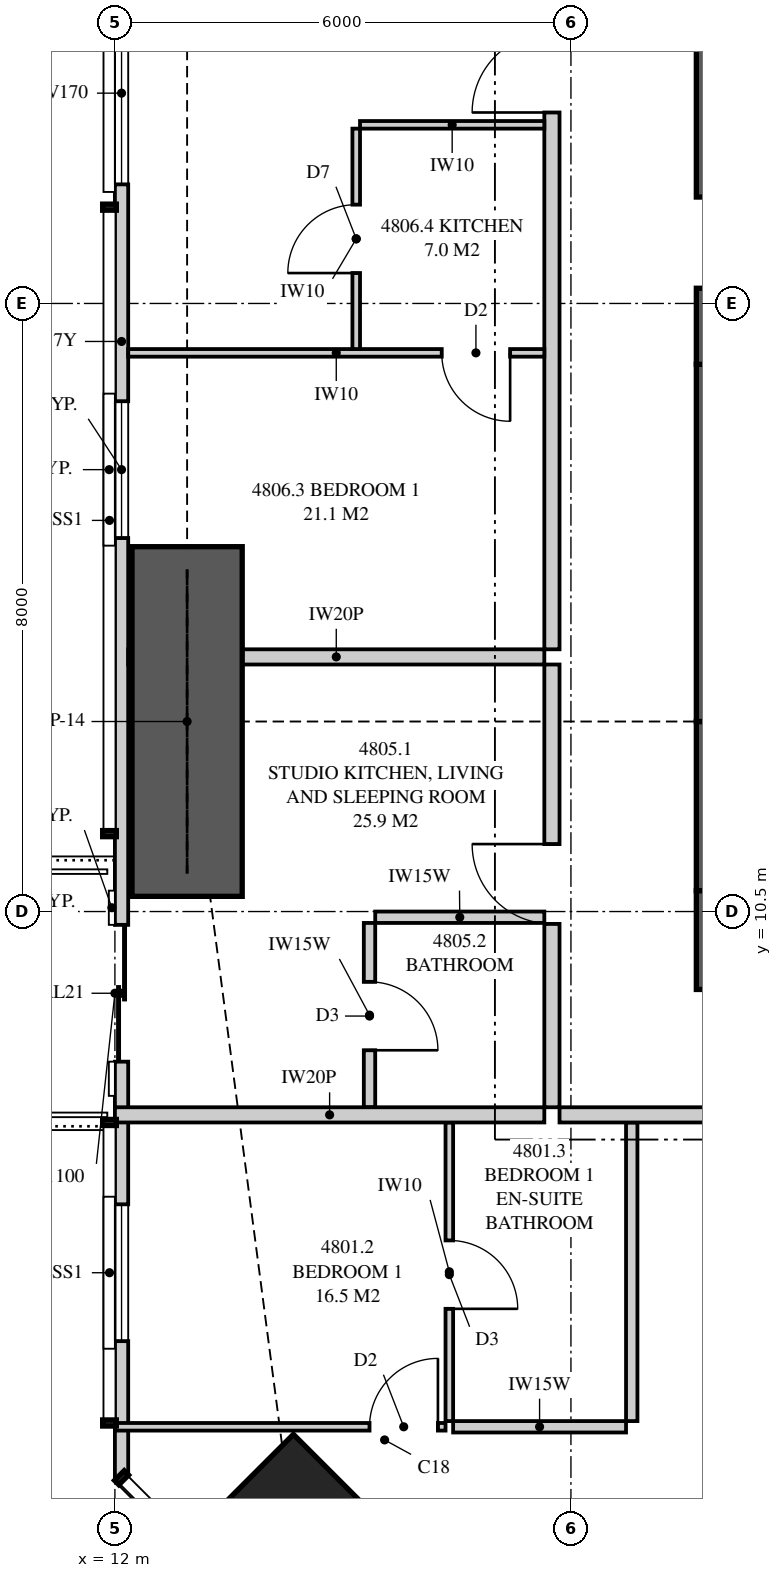
"""IFC4 building model, lengths in metres.
Left out: names, types, materials, properties, quantities, classifications, styles, units other than length and angle.
Written with IfcOpenShell. Run it as: python <this file> out.ifc"""

import sys

from ifc_helpers import new_model, si_unit, direction, frame, frame_2d, origin, origin_2d, place, context, subcontext, project, spatial, polyline, rectangle, outline, extrude, element, fill, save


model = new_model("IFC4")
c1 = context("Model", 3, precision=1e-05, world=origin(), true_north=direction((0.0, 1.0)))
c2 = subcontext(c1, "Body", "Model", "MODEL_VIEW")
j1 = project(units=[si_unit("LENGTHUNIT", "METRE"), si_unit("PLANEANGLEUNIT", "RADIAN")], contexts=[c1])
p1 = place(None, origin())
s1 = spatial("IfcSite", under=j1, at=p1, CompositionType="ELEMENT")
p2 = place(p1, origin())
s2 = spatial("IfcBuilding", under=s1, at=p2, CompositionType="ELEMENT")
p3 = place(p2, frame((0.0, 0.0, 177.8)))
s3 = spatial("IfcBuildingStorey", under=s2, at=p3, CompositionType="ELEMENT", Elevation=177.8)
p4 = place(p3, frame((14.348, 2.348, 0.0), z_axis=(0.0, 0.0, 1.0), x_axis=(0.707106781187, 0.707106781187, 0.0)))
e1 = element("IfcColumn", 1, at=p4, inside=s3, PredefinedType="COLUMN", context=c2, shape_type="SweptSolid", body=[
    extrude(rectangle(XDim=1.8, YDim=1.8, at=origin_2d()), origin(), (0.0, 0.0, 1.0), 3.35),
])
p5 = place(p3, frame((19.65, 10.125, 0.0), z_axis=(0.0, 0.0, 1.0), x_axis=(1.0, 0.0, 0.0)))
e2 = element("IfcWall", 2, at=p5, inside=s3, PredefinedType="SHEAR", context=c2, shape_type="SweptSolid", body=[
    extrude(rectangle(XDim=6.35, YDim=1.3, at=frame_2d((3.175, 0.0))), origin(), (0.0, 0.0, 1.0), 3.35),
])
p6 = place(p5, frame((4.775, 0.0, 0.0)))
e3 = element("IfcOpeningElement", 3, at=p6, cuts=e2, PredefinedType="OPENING", context=c2, shape_type="SweptSolid", body=[
    extrude(rectangle(XDim=0.75, YDim=2.1, at=frame_2d((0.375, 1.05))), frame((0.0, 0.66, 0.0), z_axis=(0.0, -1.0, 0.0), x_axis=(1.0, 0.0, 0.0)), (0.0, 0.0, 1.0), 1.32),
])
p7 = place(p3, frame((20.0, 23.3, 0.0), z_axis=(0.0, 0.0, 1.0), x_axis=(0.0, -1.0, 0.0)))
e4 = element("IfcWall", 4, at=p7, inside=s3, PredefinedType="SHEAR", context=c2, shape_type="SweptSolid", body=[
    extrude(rectangle(XDim=5.6, YDim=0.7, at=frame_2d((2.8, 0.0))), origin(), (0.0, 0.0, 1.0), 3.35),
])
p8 = place(p7, frame((3.4, 0.0, 0.0)))
e5 = element("IfcOpeningElement", 5, at=p8, cuts=e4, PredefinedType="OPENING", context=c2, shape_type="SweptSolid", body=[
    extrude(rectangle(XDim=1.2, YDim=2.2, at=frame_2d((0.6, 1.1))), frame((0.0, 0.36, 0.0), z_axis=(0.0, -1.0, 0.0), x_axis=(1.0, 0.0, 0.0)), (0.0, 0.0, 1.0), 0.72),
])
p9 = place(p3, frame((20.0, 17.7, 0.0), z_axis=(0.0, 0.0, 1.0), x_axis=(0.0, -1.0, 0.0)))
e6 = element("IfcWall", 6, at=p9, inside=s3, PredefinedType="SHEAR", context=c2, shape_type="SweptSolid", body=[
    extrude(rectangle(XDim=4.7, YDim=0.7, at=frame_2d((2.35, 0.0))), origin(), (0.0, 0.0, 1.0), 3.35),
])
p10 = place(p3, frame((20.0, 13.0, 0.0), z_axis=(0.0, 0.0, 1.0), x_axis=(0.0, -1.0, 0.0)))
e7 = element("IfcWall", 7, at=p10, inside=s3, PredefinedType="SHEAR", context=c2, shape_type="SweptSolid", body=[
    extrude(rectangle(XDim=2.225, YDim=0.7, at=frame_2d((1.113, 0.0))), origin(), (0.0, 0.0, 1.0), 3.35),
])
p11 = place(p3, frame((12.087, 32.949, 0.0), z_axis=(0.0, 0.0, 1.0), x_axis=(0.0, -1.0, 0.0)))
e8 = element("IfcWall", 8, at=p11, inside=s3, PredefinedType="SOLIDWALL", context=c2, shape_type="SweptSolid", body=[
    extrude(outline(polyline([(0.0, 0.0), (29.897, 0.0), (29.897, 3.11), (20.191, 3.11), (20.191, 2.15), (20.051, 2.15), (20.051, 3.11), (19.949, 3.11), (19.949, 2.15), (7.949, 2.15), (7.949, 3.11), (7.823, 3.11), (7.823, 2.15), (7.73, 2.15), (7.73, 3.11), (0.0, 3.11), (0.0, 0.0)])), frame((0.0, 0.087, 0.0), z_axis=(0.0, -1.0, 0.0), x_axis=(1.0, 0.0, 0.0)), (0.0, 0.0, 1.0), 0.175),
])
p12 = place(p11, frame((1.237, 0.0, 0.4)))
e9 = element("IfcOpeningElement", 9, at=p12, cuts=e8, PredefinedType="OPENING", context=c2, shape_type="SweptSolid", body=[
    extrude(rectangle(XDim=1.2, YDim=1.7, at=frame_2d((0.6, 0.85))), frame((0.0, 0.097, 0.0), z_axis=(0.0, -1.0, 0.0), x_axis=(1.0, 0.0, 0.0)), (0.0, 0.0, 1.0), 0.195),
])
p13 = place(p11, frame((10.482, 0.0, 0.4)))
e10 = element("IfcOpeningElement", 10, at=p13, cuts=e8, PredefinedType="OPENING", context=c2, shape_type="SweptSolid", body=[
    extrude(rectangle(XDim=2.4, YDim=1.7, at=frame_2d((1.2, 0.85))), frame((0.0, 0.097, 0.0), z_axis=(0.0, -1.0, 0.0), x_axis=(1.0, 0.0, 0.0)), (0.0, 0.0, 1.0), 0.195),
])
p14 = place(p11, frame((15.735, 0.0, 0.4)))
e11 = element("IfcOpeningElement", 11, at=p14, cuts=e8, PredefinedType="OPENING", context=c2, shape_type="SweptSolid", body=[
    extrude(rectangle(XDim=1.8, YDim=1.7, at=frame_2d((0.9, 0.85))), frame((0.0, 0.097, 0.0), z_axis=(0.0, -1.0, 0.0), x_axis=(1.0, 0.0, 0.0)), (0.0, 0.0, 1.0), 0.195),
])
p15 = place(p11, frame((22.624, 0.0, 0.0)))
e12 = element("IfcOpeningElement", 12, at=p15, cuts=e8, PredefinedType="OPENING", context=c2, shape_type="SweptSolid", body=[
    extrude(rectangle(XDim=1.8, YDim=2.1, at=frame_2d((0.9, 1.05))), frame((0.0, 0.097, 0.0), z_axis=(0.0, -1.0, 0.0), x_axis=(1.0, 0.0, 0.0)), (0.0, 0.0, 1.0), 0.195),
])
p16 = place(p11, frame((26.301, 0.0, 0.4)))
e13 = element("IfcOpeningElement", 13, at=p16, cuts=e8, PredefinedType="OPENING", context=c2, shape_type="SweptSolid", body=[
    extrude(rectangle(XDim=1.8, YDim=1.7, at=frame_2d((0.9, 0.85))), frame((0.0, 0.097, 0.0), z_axis=(0.0, -1.0, 0.0), x_axis=(1.0, 0.0, 0.0)), (0.0, 0.0, 1.0), 0.195),
])
p17 = place(p3, frame((17.85, 7.825, 0.0), z_axis=(0.0, 0.0, 1.0), x_axis=(1.0, 0.0, 0.0)))
e14 = element("IfcWall", 14, at=p17, inside=s3, PredefinedType="PARTITIONING", context=c2, shape_type="SweptSolid", body=[
    extrude(outline(polyline([(0.0, 0.0), (5.9, 0.0), (5.9, 3.11), (4.737, 3.11), (4.737, 2.541), (4.062, 2.541), (4.062, 3.11), (0.0, 3.11), (0.0, 0.0)])), frame((0.0, 0.1, 0.0), z_axis=(0.0, -1.0, 0.0), x_axis=(1.0, 0.0, 0.0)), (0.0, 0.0, 1.0), 0.2),
])
p18 = place(p17, frame((2.5, 0.0, 0.0)))
e15 = element("IfcOpeningElement", 15, at=p18, cuts=e14, PredefinedType="OPENING", context=c2, shape_type="SweptSolid", body=[
    extrude(rectangle(XDim=1.05, YDim=2.2, at=frame_2d((0.525, 1.1))), frame((0.0, 0.11, 0.0), z_axis=(0.0, -1.0, 0.0), x_axis=(1.0, 0.0, 0.0)), (0.0, 0.0, 1.0), 0.22),
])
p19 = place(p3, frame((16.4, 3.796, 0.0), z_axis=(0.0, 0.0, 1.0), x_axis=(0.0, 1.0, 0.0)))
e16 = element("IfcWall", 16, at=p19, inside=s3, PredefinedType="PARTITIONING", context=c2, shape_type="SweptSolid", body=[
    extrude(rectangle(XDim=3.929, YDim=0.1, at=frame_2d((1.964, 0.0))), origin(), (0.0, 0.0, 1.0), 3.11),
])
p20 = place(p19, frame((1.477, 0.0, 0.0)))
e17 = element("IfcOpeningElement", 17, at=p20, cuts=e16, PredefinedType="OPENING", context=c2, shape_type="SweptSolid", body=[
    extrude(rectangle(XDim=0.9, YDim=2.1, at=frame_2d((0.45, 1.05))), frame((0.0, 0.06, 0.0), z_axis=(0.0, -1.0, 0.0), x_axis=(1.0, 0.0, 0.0)), (0.0, 0.0, 1.0), 0.12),
])
p21 = place(p3, frame((16.35, 3.721, 0.0), z_axis=(0.0, 0.0, 1.0), x_axis=(-1.0, 0.0, 0.0)))
e18 = element("IfcWall", 18, at=p21, inside=s3, PredefinedType="PARTITIONING", context=c2, shape_type="SweptSolid", body=[
    extrude(outline(polyline([(0.0, 0.0), (4.35, 0.0), (4.35, 3.11), (3.049, 3.11), (3.049, 2.15), (1.314, 2.15), (1.314, 3.11), (0.0, 3.11), (0.0, 0.0)])), frame((0.0, 0.05, 0.0), z_axis=(0.0, -1.0, 0.0), x_axis=(1.0, 0.0, 0.0)), (0.0, 0.0, 1.0), 0.1),
])
p22 = place(p21, frame((0.1, 0.0, 0.0)))
e19 = element("IfcOpeningElement", 19, at=p22, cuts=e18, PredefinedType="OPENING", context=c2, shape_type="SweptSolid", body=[
    extrude(rectangle(XDim=0.9, YDim=2.1, at=frame_2d((0.45, 1.05))), frame((0.0, 0.06, 0.0), z_axis=(0.0, -1.0, 0.0), x_axis=(1.0, 0.0, 0.0)), (0.0, 0.0, 1.0), 0.12),
])
p23 = place(p3, frame((18.725, 3.721, 0.0), z_axis=(0.0, 0.0, 1.0), x_axis=(-1.0, 0.0, 0.0)))
e20 = element("IfcWall", 20, at=p23, inside=s3, PredefinedType="PLUMBINGWALL", context=c2, shape_type="SweptSolid", body=[
    extrude(rectangle(XDim=2.275, YDim=0.15, at=frame_2d((1.138, 0.0))), origin(), (0.0, 0.0, 1.0), 3.11),
])
p24 = place(p3, frame((18.8, 3.796, 0.0), z_axis=(0.0, 0.0, 1.0), x_axis=(0.0, 1.0, 0.0)))
e21 = element("IfcWall", 21, at=p24, inside=s3, PredefinedType="PLUMBINGWALL", context=c2, shape_type="SweptSolid", body=[
    extrude(rectangle(XDim=3.929, YDim=0.15, at=frame_2d((1.964, 0.0))), origin(), (0.0, 0.0, 1.0), 3.11),
])
p25 = place(p3, frame((12.0, 7.825, 0.0), z_axis=(0.0, 0.0, 1.0), x_axis=(1.0, 0.0, 0.0)))
e22 = element("IfcWall", 22, at=p25, inside=s3, PredefinedType="PARTITIONING", context=c2, shape_type="SweptSolid", body=[
    extrude(outline(polyline([(0.0, 0.0), (5.65, 0.0), (5.65, 3.11), (2.547, 3.11), (2.547, 2.15), (0.712, 2.15), (0.712, 3.11), (0.0, 3.11), (0.0, 0.0)])), frame((0.0, 0.1, 0.0), z_axis=(0.0, -1.0, 0.0), x_axis=(1.0, 0.0, 0.0)), (0.0, 0.0, 1.0), 0.2),
])
p26 = place(p3, frame((12.175, 13.85, 0.0), z_axis=(0.0, 0.0, 1.0), x_axis=(1.0, 0.0, 0.0)))
e23 = element("IfcWall", 23, at=p26, inside=s3, PredefinedType="PARTITIONING", context=c2, shape_type="SweptSolid", body=[
    extrude(outline(polyline([(0.529, 2.15), (0.0, 2.15), (0.0, 0.0), (0.529, 0.0), (0.529, 0.834), (1.021, 0.834), (1.021, 0.0), (5.475, 0.0), (5.475, 3.11), (1.685, 3.11), (1.685, 2.15), (1.021, 2.15), (1.021, 1.315), (0.529, 1.315), (0.529, 2.15)])), frame((0.0, 0.1, 0.0), z_axis=(0.0, -1.0, 0.0), x_axis=(1.0, 0.0, 0.0)), (0.0, 0.0, 1.0), 0.2),
])
p27 = place(p3, frame((17.75, 7.925, 0.0), z_axis=(0.0, 0.0, 1.0), x_axis=(0.0, 1.0, 0.0)))
e24 = element("IfcWall", 24, at=p27, inside=s3, PredefinedType="PARTITIONING", context=c2, shape_type="SweptSolid", body=[
    extrude(outline(polyline([(0.0, 0.0), (5.825, 0.0), (5.825, 3.11), (5.412, 3.11), (5.412, 2.541), (4.738, 2.541), (4.738, 3.11), (0.0, 3.11), (0.0, 0.0)])), frame((0.0, 0.1, 0.0), z_axis=(0.0, -1.0, 0.0), x_axis=(1.0, 0.0, 0.0)), (0.0, 0.0, 1.0), 0.2),
])
p28 = place(p27, frame((2.413, 0.0, 0.0)))
e25 = element("IfcOpeningElement", 25, at=p28, cuts=e24, PredefinedType="OPENING", context=c2, shape_type="SweptSolid", body=[
    extrude(rectangle(XDim=1.05, YDim=2.2, at=frame_2d((0.525, 1.1))), frame((0.0, 0.11, 0.0), z_axis=(0.0, -1.0, 0.0), x_axis=(1.0, 0.0, 0.0)), (0.0, 0.0, 1.0), 0.22),
])
p29 = place(p3, frame((15.35, 7.925, 0.0), z_axis=(0.0, 0.0, 1.0), x_axis=(0.0, 1.0, 0.0)))
e26 = element("IfcWall", 26, at=p29, inside=s3, PredefinedType="PLUMBINGWALL", context=c2, shape_type="SweptSolid", body=[
    extrude(rectangle(XDim=2.425, YDim=0.15, at=frame_2d((1.212, 0.0))), origin(), (0.0, 0.0, 1.0), 3.11),
])
p30 = place(p29, frame((0.75, 0.0, 0.0)))
e27 = element("IfcOpeningElement", 27, at=p30, cuts=e26, PredefinedType="OPENING", context=c2, shape_type="SweptSolid", body=[
    extrude(rectangle(XDim=0.9, YDim=2.1, at=frame_2d((0.45, 1.05))), frame((0.0, 0.085, 0.0), z_axis=(0.0, -1.0, 0.0), x_axis=(1.0, 0.0, 0.0)), (0.0, 0.0, 1.0), 0.17),
])
p31 = place(p3, frame((15.425, 10.425, 0.0), z_axis=(0.0, 0.0, 1.0), x_axis=(1.0, 0.0, 0.0)))
e28 = element("IfcWall", 28, at=p31, inside=s3, PredefinedType="PLUMBINGWALL", context=c2, shape_type="SweptSolid", body=[
    extrude(rectangle(XDim=2.225, YDim=0.15, at=frame_2d((1.112, 0.0))), origin(), (0.0, 0.0, 1.0), 3.11),
])
p32 = place(p3, frame((17.75, 13.95, 0.0), z_axis=(0.0, 0.0, 1.0), x_axis=(0.0, 1.0, 0.0)))
e29 = element("IfcWall", 29, at=p32, inside=s3, PredefinedType="PARTITIONING", context=c2, shape_type="SweptSolid", body=[
    extrude(outline(polyline([(0.0, 0.0), (15.125, 0.0), (15.125, 3.11), (11.387, 3.11), (11.387, 2.541), (10.713, 2.541), (10.713, 3.11), (0.0, 3.11), (0.0, 0.0)])), frame((0.0, 0.1, 0.0), z_axis=(0.0, -1.0, 0.0), x_axis=(1.0, 0.0, 0.0)), (0.0, 0.0, 1.0), 0.2),
])
p33 = place(p32, frame((7.062, 0.0, 0.0)))
e30 = element("IfcOpeningElement", 30, at=p33, cuts=e29, PredefinedType="OPENING", context=c2, shape_type="SweptSolid", body=[
    extrude(rectangle(XDim=1.05, YDim=2.2, at=frame_2d((0.525, 1.1))), frame((0.0, 0.11, 0.0), z_axis=(0.0, -1.0, 0.0), x_axis=(1.0, 0.0, 0.0)), (0.0, 0.0, 1.0), 0.22),
])
p34 = place(p3, frame((12.175, 17.85, 0.0), z_axis=(0.0, 0.0, 1.0), x_axis=(1.0, 0.0, 0.0)))
e31 = element("IfcWall", 31, at=p34, inside=s3, PredefinedType="PARTITIONING", context=c2, shape_type="SweptSolid", body=[
    extrude(outline(polyline([(0.0, 0.0), (5.475, 0.0), (5.475, 3.11), (1.635, 3.11), (1.635, 2.15), (0.0, 2.15), (0.0, 3.11), (0.0, 0.0)])), frame((0.0, 0.05, 0.0), z_axis=(0.0, -1.0, 0.0), x_axis=(1.0, 0.0, 0.0)), (0.0, 0.0, 1.0), 0.1),
])
p35 = place(p34, frame((4.125, 0.0, 0.0)))
e32 = element("IfcOpeningElement", 32, at=p35, cuts=e31, PredefinedType="OPENING", context=c2, shape_type="SweptSolid", body=[
    extrude(rectangle(XDim=0.9, YDim=2.1, at=frame_2d((0.45, 1.05))), frame((0.0, 0.06, 0.0), z_axis=(0.0, -1.0, 0.0), x_axis=(1.0, 0.0, 0.0)), (0.0, 0.0, 1.0), 0.12),
])
p36 = place(p3, frame((15.175, 17.9, 0.0), z_axis=(0.0, 0.0, 1.0), x_axis=(0.0, 1.0, 0.0)))
e33 = element("IfcWall", 33, at=p36, inside=s3, PredefinedType="PARTITIONING", context=c2, shape_type="SweptSolid", body=[
    extrude(rectangle(XDim=2.9, YDim=0.1, at=frame_2d((1.45, 0.0))), origin(), (0.0, 0.0, 1.0), 3.11),
])
p37 = place(p36, frame((1.0, 0.0, 0.0)))
e34 = element("IfcOpeningElement", 34, at=p37, cuts=e33, PredefinedType="OPENING", context=c2, shape_type="SweptSolid", body=[
    extrude(rectangle(XDim=0.9, YDim=2.1, at=frame_2d((0.45, 1.05))), frame((0.0, 0.06, 0.0), z_axis=(0.0, -1.0, 0.0), x_axis=(1.0, 0.0, 0.0)), (0.0, 0.0, 1.0), 0.12),
])
p38 = place(p3, frame((15.225, 20.85, 0.0), z_axis=(0.0, 0.0, 1.0), x_axis=(1.0, 0.0, 0.0)))
e35 = element("IfcWall", 35, at=p38, inside=s3, PredefinedType="PARTITIONING", context=c2, shape_type="SweptSolid", body=[
    extrude(rectangle(XDim=2.425, YDim=0.1, at=frame_2d((1.212, 0.0))), origin(), (0.0, 0.0, 1.0), 3.11),
])
p39 = place(p3, frame((12.95, 10.7, 0.0), z_axis=(0.0, 0.0, 1.0), x_axis=(0.0, 1.0, 0.0)))
e36 = element("IfcWall", 36, at=p39, inside=s3, PredefinedType="SHEAR", context=c2, shape_type="SweptSolid", body=[
    extrude(rectangle(XDim=4.6, YDim=1.45, at=frame_2d((2.3, 0.0))), origin(), (0.0, 0.0, 1.0), 3.35),
])
p40 = place(p13, origin())
e37 = element("IfcWindow", 37, at=p40, inside=s3, PartitioningType="SINGLE_PANEL", PredefinedType="WINDOW", context=c2, shape_type="SweptSolid", body=[
    extrude(rectangle(XDim=2.4, YDim=1.7, at=frame_2d((1.2, 0.85))), frame((0.0, 0.03, 0.0), z_axis=(0.0, -1.0, 0.0), x_axis=(1.0, 0.0, 0.0)), (0.0, 0.0, 1.0), 0.06),
])
fill(e10, e37)
p41 = place(p14, origin())
e38 = element("IfcWindow", 38, at=p41, inside=s3, PartitioningType="SINGLE_PANEL", PredefinedType="WINDOW", context=c2, shape_type="SweptSolid", body=[
    extrude(rectangle(XDim=1.8, YDim=1.7, at=frame_2d((0.9, 0.85))), frame((0.0, 0.03, 0.0), z_axis=(0.0, -1.0, 0.0), x_axis=(1.0, 0.0, 0.0)), (0.0, 0.0, 1.0), 0.06),
])
fill(e11, e38)
p42 = place(p15, origin())
e39 = element("IfcDoor", 39, at=p42, inside=s3, OperationType="SLIDING_TO_LEFT", PredefinedType="DOOR", context=c2, shape_type="SweptSolid", body=[
    extrude(rectangle(XDim=1.8, YDim=2.1, at=frame_2d((0.9, 1.05))), frame((0.0, 0.025, 0.0), z_axis=(0.0, -1.0, 0.0), x_axis=(1.0, 0.0, 0.0)), (0.0, 0.0, 1.0), 0.05),
])
fill(e12, e39)
p43 = place(p16, origin())
e40 = element("IfcWindow", 40, at=p43, inside=s3, PartitioningType="SINGLE_PANEL", PredefinedType="WINDOW", context=c2, shape_type="SweptSolid", body=[
    extrude(rectangle(XDim=1.8, YDim=1.7, at=frame_2d((0.9, 0.85))), frame((0.0, 0.03, 0.0), z_axis=(0.0, -1.0, 0.0), x_axis=(1.0, 0.0, 0.0)), (0.0, 0.0, 1.0), 0.06),
])
fill(e13, e40)
p44 = place(p22, frame((0.9, 0.0, 0.0), z_axis=(0.0, 0.0, 1.0), x_axis=(-1.0, 0.0, 0.0)))
e41 = element("IfcDoor", 41, at=p44, inside=s3, OperationType="SINGLE_SWING_RIGHT", PredefinedType="DOOR", context=c2, shape_type="SweptSolid", body=[
    extrude(rectangle(XDim=0.9, YDim=2.1, at=frame_2d((0.45, 1.05))), frame((0.0, 0.025, 0.0), z_axis=(0.0, -1.0, 0.0), x_axis=(1.0, 0.0, 0.0)), (0.0, 0.0, 1.0), 0.05),
])
fill(e19, e41)
p45 = place(p20, frame((0.9, 0.0, 0.0), z_axis=(0.0, 0.0, 1.0), x_axis=(-1.0, 0.0, 0.0)))
e42 = element("IfcDoor", 42, at=p45, inside=s3, OperationType="SINGLE_SWING_RIGHT", PredefinedType="DOOR", context=c2, shape_type="SweptSolid", body=[
    extrude(rectangle(XDim=0.9, YDim=2.1, at=frame_2d((0.45, 1.05))), frame((0.0, 0.025, 0.0), z_axis=(0.0, -1.0, 0.0), x_axis=(1.0, 0.0, 0.0)), (0.0, 0.0, 1.0), 0.05),
])
fill(e17, e42)
p46 = place(p28, origin())
e43 = element("IfcDoor", 43, at=p46, inside=s3, OperationType="SINGLE_SWING_RIGHT", PredefinedType="DOOR", context=c2, shape_type="SweptSolid", body=[
    extrude(rectangle(XDim=1.05, YDim=2.2, at=frame_2d((0.525, 1.1))), frame((0.0, 0.025, 0.0), z_axis=(0.0, -1.0, 0.0), x_axis=(1.0, 0.0, 0.0)), (0.0, 0.0, 1.0), 0.05),
])
fill(e25, e43)
p47 = place(p30, frame((0.9, 0.0, 0.0), z_axis=(0.0, 0.0, 1.0), x_axis=(-1.0, 0.0, 0.0)))
e44 = element("IfcDoor", 44, at=p47, inside=s3, OperationType="SINGLE_SWING_RIGHT", PredefinedType="DOOR", context=c2, shape_type="SweptSolid", body=[
    extrude(rectangle(XDim=0.9, YDim=2.1, at=frame_2d((0.45, 1.05))), frame((0.0, 0.025, 0.0), z_axis=(0.0, -1.0, 0.0), x_axis=(1.0, 0.0, 0.0)), (0.0, 0.0, 1.0), 0.05),
])
fill(e27, e44)
p48 = place(p33, origin())
e45 = element("IfcDoor", 45, at=p48, inside=s3, OperationType="SINGLE_SWING_LEFT", PredefinedType="DOOR", context=c2, shape_type="SweptSolid", body=[
    extrude(rectangle(XDim=1.05, YDim=2.2, at=frame_2d((0.525, 1.1))), frame((0.0, 0.025, 0.0), z_axis=(0.0, -1.0, 0.0), x_axis=(1.0, 0.0, 0.0)), (0.0, 0.0, 1.0), 0.05),
])
fill(e30, e45)
p49 = place(p35, frame((0.9, 0.0, 0.0), z_axis=(0.0, 0.0, 1.0), x_axis=(-1.0, 0.0, 0.0)))
e46 = element("IfcDoor", 46, at=p49, inside=s3, OperationType="SINGLE_SWING_LEFT", PredefinedType="DOOR", context=c2, shape_type="SweptSolid", body=[
    extrude(rectangle(XDim=0.9, YDim=2.1, at=frame_2d((0.45, 1.05))), frame((0.0, 0.025, 0.0), z_axis=(0.0, -1.0, 0.0), x_axis=(1.0, 0.0, 0.0)), (0.0, 0.0, 1.0), 0.05),
])
fill(e32, e46)
p50 = place(p37, origin())
e47 = element("IfcDoor", 47, at=p50, inside=s3, OperationType="SINGLE_SWING_LEFT", PredefinedType="DOOR", context=c2, shape_type="SweptSolid", body=[
    extrude(rectangle(XDim=0.9, YDim=2.1, at=frame_2d((0.45, 1.05))), frame((0.0, 0.025, 0.0), z_axis=(0.0, -1.0, 0.0), x_axis=(1.0, 0.0, 0.0)), (0.0, 0.0, 1.0), 0.05),
])
fill(e34, e47)
save(model, sys.argv[1])
